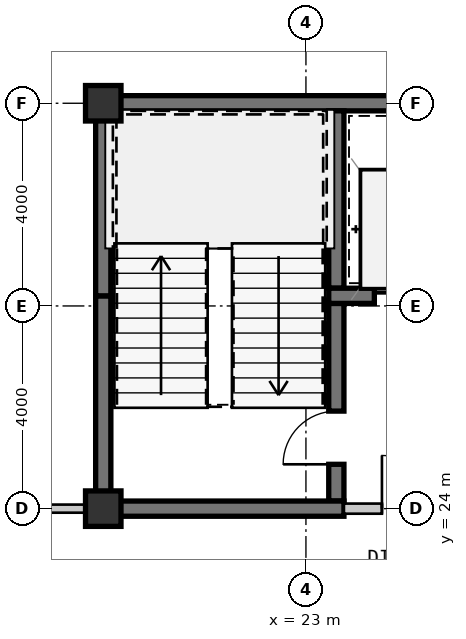
"""IFC4 building model, lengths in metres.
Left out: names, types, materials, properties, quantities, classifications, styles, units other than length and angle.
Written with IfcOpenShell. Run it as: python <this file> out.ifc"""

import sys

from ifc_helpers import new_model, si_unit, direction, frame, frame_2d, origin, origin_2d, place, context, subcontext, project, spatial, rectangle, extrude, source, transform, mapped, element, fill, save


model = new_model("IFC4")
c1 = context("Model", 3, precision=1e-05, world=origin(), true_north=direction((0.0, 1.0)))
c2 = subcontext(c1, "Body", "Model", "MODEL_VIEW")
j1 = project(units=[si_unit("LENGTHUNIT", "METRE"), si_unit("PLANEANGLEUNIT", "RADIAN")], contexts=[c1])
p1 = place(None, origin())
s1 = spatial("IfcSite", under=j1, at=p1, CompositionType="ELEMENT")
p2 = place(p1, origin())
s2 = spatial("IfcBuilding", under=s1, at=p2, CompositionType="ELEMENT")
p3 = place(p2, frame((0.0, 0.0, 80.85)))
s3 = spatial("IfcBuildingStorey", under=s2, at=p3, CompositionType="ELEMENT", Elevation=80.85)
m1 = source(origin(), c2, "Body", "SweptSolid", [
    extrude(rectangle(XDim=0.7, YDim=0.7, at=origin_2d()), origin(), (0.0, 0.0, 1.0), 3.15),
])
for number, where, z_axis, x_axis in (
    (1, (19.0, 24.0, 0.0), (0.0, 0.0, 1.0), (1.0, 0.0, 0.0)),
    (2, (19.0, 32.0, 0.0), (0.0, 0.0, 1.0), (1.0, 0.0, 0.0)),
):
    element("IfcColumn", number, at=place(p3, frame(where, z_axis=z_axis, x_axis=x_axis)), inside=s3, PredefinedType="COLUMN", context=c2, shape_type="MappedRepresentation", body=[
        mapped(m1, transform((0.0, 0.0, 0.0), scale=1.0)),
    ])
m2 = source(origin(), c2, "Body", "SweptSolid", [
    extrude(rectangle(XDim=9.15, YDim=0.3, at=frame_2d((4.575, 0.0))), origin(), (0.0, 0.0, 1.0), 2.93),
])
p4 = place(p3, frame((18.85, 32.0, 0.0), z_axis=(0.0, 0.0, 1.0), x_axis=(1.0, 0.0, 0.0)))
e3 = element("IfcWall", 3, at=p4, inside=s3, PredefinedType="SHEAR", context=c2, shape_type="MappedRepresentation", body=[
    mapped(m2, transform((0.0, 0.0, 0.0), scale=1.0)),
])
m3 = source(origin(), c2, "Body", "SweptSolid", [
    extrude(rectangle(XDim=4.05, YDim=0.3, at=frame_2d((2.025, 0.0))), origin(), (0.0, 0.0, 1.0), 2.93),
])
p5 = place(p3, frame((19.0, 24.15, 0.0), z_axis=(0.0, 0.0, 1.0), x_axis=(0.0, 1.0, 0.0)))
e4 = element("IfcWall", 4, at=p5, inside=s3, PredefinedType="SHEAR", context=c2, shape_type="MappedRepresentation", body=[
    mapped(m3, transform((0.0, 0.0, 0.0), scale=1.0)),
])
m4 = source(origin(), c2, "Body", "SweptSolid", [
    extrude(rectangle(XDim=3.65, YDim=0.3, at=frame_2d((1.825, 0.0))), origin(), (0.0, 0.0, 1.0), 2.93),
])
p6 = place(p3, frame((19.0, 28.2, 0.0), z_axis=(0.0, 0.0, 1.0), x_axis=(0.0, 1.0, 0.0)))
e5 = element("IfcWall", 5, at=p6, inside=s3, PredefinedType="SHEAR", context=c2, shape_type="MappedRepresentation", body=[
    mapped(m4, transform((0.0, 0.0, 0.0), scale=1.0)),
])
m5 = source(origin(), c2, "Body", "SweptSolid", [
    extrude(rectangle(XDim=3.5, YDim=0.3, at=frame_2d((1.75, 0.0))), origin(), (0.0, 0.0, 1.0), 2.93),
])
p7 = place(p3, frame((23.6, 28.35, 0.0), z_axis=(0.0, 0.0, 1.0), x_axis=(0.0, 1.0, 0.0)))
e6 = element("IfcWall", 6, at=p7, inside=s3, PredefinedType="SHEAR", context=c2, shape_type="MappedRepresentation", body=[
    mapped(m5, transform((0.0, 0.0, 0.0), scale=1.0)),
])
m6 = source(origin(), c2, "Body", "SweptSolid", [
    extrude(rectangle(XDim=3.9, YDim=0.3, at=frame_2d((1.95, 0.0))), origin(), (0.0, 0.0, 1.0), 2.93),
])
p8 = place(p3, frame((23.6, 24.15, 0.0), z_axis=(0.0, 0.0, 1.0), x_axis=(0.0, 1.0, 0.0)))
e7 = element("IfcWall", 7, at=p8, inside=s3, PredefinedType="SHEAR", context=c2, shape_type="MappedRepresentation", body=[
    mapped(m6, transform((0.0, 0.0, 0.0), scale=1.0)),
])
m7 = source(origin(), c2, "Body", "SweptSolid", [
    extrude(rectangle(XDim=1.05, YDim=2.1, at=frame_2d((0.525, 1.05))), frame((0.0, 0.16, 0.0), z_axis=(0.0, -1.0, 0.0), x_axis=(1.0, 0.0, 0.0)), (0.0, 0.0, 1.0), 0.32),
])
p9 = place(p8, frame((0.725, 0.0, 0.0)))
e8 = element("IfcOpeningElement", 8, at=p9, cuts=e7, PredefinedType="OPENING", context=c2, shape_type="MappedRepresentation", body=[
    mapped(m7, transform((0.0, 0.0, 0.0), scale=1.0)),
])
m8 = source(origin(), c2, "Body", "SweptSolid", [
    extrude(rectangle(XDim=4.9, YDim=0.3, at=frame_2d((2.45, 0.0))), origin(), (0.0, 0.0, 1.0), 2.93),
])
p10 = place(p3, frame((18.85, 24.0, 0.0), z_axis=(0.0, 0.0, 1.0), x_axis=(1.0, 0.0, 0.0)))
e9 = element("IfcWall", 9, at=p10, inside=s3, PredefinedType="SHEAR", context=c2, shape_type="MappedRepresentation", body=[
    mapped(m8, transform((0.0, 0.0, 0.0), scale=1.0)),
])
m9 = source(origin(), c2, "Body", "SweptSolid", [
    extrude(rectangle(XDim=2.9, YDim=0.3, at=frame_2d((1.45, 0.0))), origin(), (0.0, 0.0, 1.0), 2.93),
])
p11 = place(p3, frame((23.45, 28.2, 0.0), z_axis=(0.0, 0.0, 1.0), x_axis=(1.0, 0.0, 0.0)))
e10 = element("IfcWall", 10, at=p11, inside=s3, PredefinedType="SHEAR", context=c2, shape_type="MappedRepresentation", body=[
    mapped(m9, transform((0.0, 0.0, 0.0), scale=1.0)),
])
m10 = source(origin(), c2, "Body", "SweptSolid", [
    extrude(rectangle(XDim=1.1, YDim=2.15, at=frame_2d((0.55, 1.075))), frame((0.0, 0.16, 0.0), z_axis=(0.0, -1.0, 0.0), x_axis=(1.0, 0.0, 0.0)), (0.0, 0.0, 1.0), 0.32),
])
p12 = place(p11, frame((0.9, 0.0, 0.0)))
e11 = element("IfcOpeningElement", 11, at=p12, cuts=e10, PredefinedType="OPENING", context=c2, shape_type="MappedRepresentation", body=[
    mapped(m10, transform((0.0, 0.0, 0.0), scale=1.0)),
])
m11 = source(origin(), c2, "Body", "SweptSolid", [
    extrude(rectangle(XDim=2.7, YDim=0.2, at=frame_2d((1.35, 0.0))), origin(), (0.0, 0.0, 1.0), 2.47),
])
p13 = place(p3, frame((23.75, 24.0, 0.0), z_axis=(0.0, 0.0, 1.0), x_axis=(1.0, 0.0, 0.0)))
e12 = element("IfcWall", 12, at=p13, inside=s3, PredefinedType="SOLIDWALL", context=c2, shape_type="MappedRepresentation", body=[
    mapped(m11, transform((0.0, 0.0, 0.0), scale=1.0)),
])
m12 = source(origin(), c2, "Body", "SweptSolid", [
    extrude(rectangle(XDim=1.05, YDim=2.1, at=frame_2d((0.525, 1.05))), frame((0.0, 0.11, 0.0), z_axis=(0.0, -1.0, 0.0), x_axis=(1.0, 0.0, 0.0)), (0.0, 0.0, 1.0), 0.22),
])
p14 = place(p13, frame((0.75, 0.0, 0.0)))
e13 = element("IfcOpeningElement", 13, at=p14, cuts=e12, PredefinedType="OPENING", context=c2, shape_type="MappedRepresentation", body=[
    mapped(m12, transform((0.0, 0.0, 0.0), scale=1.0)),
])
m13 = source(origin(), c2, "Body", "SweptSolid", [
    extrude(rectangle(XDim=4.17, YDim=0.16, at=frame_2d((2.085, 0.0))), origin(), (0.0, 0.0, 1.0), 2.93),
])
p15 = place(p3, frame((14.68, 24.0, 0.0), z_axis=(0.0, 0.0, 1.0), x_axis=(1.0, 0.0, 0.0)))
e14 = element("IfcWall", 14, at=p15, inside=s3, PredefinedType="PARTITIONING", context=c2, shape_type="MappedRepresentation", body=[
    mapped(m13, transform((0.0, 0.0, 0.0), scale=1.0)),
])
m14 = source(origin(), c2, "Body", "SweptSolid", [
    extrude(rectangle(XDim=0.92, YDim=2.1, at=frame_2d((0.46, 1.05))), frame((0.0, 0.09, 0.0), z_axis=(0.0, -1.0, 0.0), x_axis=(1.0, 0.0, 0.0)), (0.0, 0.0, 1.0), 0.18),
])
p16 = place(p15, frame((1.69, 0.0, 0.0)))
e15 = element("IfcOpeningElement", 15, at=p16, cuts=e14, PredefinedType="OPENING", context=c2, shape_type="MappedRepresentation", body=[
    mapped(m14, transform((0.0, 0.0, 0.0), scale=1.0)),
])
m15 = source(origin(), c2, "Body", "SweptSolid", [
    extrude(rectangle(XDim=1.05, YDim=2.1, at=frame_2d((0.525, 1.05))), frame((0.0, 0.025, 0.0), z_axis=(0.0, -1.0, 0.0), x_axis=(1.0, 0.0, 0.0)), (0.0, 0.0, 1.0), 0.05),
])
p17 = place(p9, origin())
e16 = element("IfcDoor", 16, at=p17, inside=s3, OperationType="SINGLE_SWING_LEFT", PredefinedType="DOOR", context=c2, shape_type="MappedRepresentation", body=[
    mapped(m15, transform((0.0, 0.0, 0.0), scale=1.0)),
])
fill(e8, e16)
m16 = source(origin(), c2, "Body", "SweptSolid", [
    extrude(rectangle(XDim=1.1, YDim=2.15, at=frame_2d((0.55, 1.075))), frame((0.0, 0.025, 0.0), z_axis=(0.0, -1.0, 0.0), x_axis=(1.0, 0.0, 0.0)), (0.0, 0.0, 1.0), 0.05),
])
p18 = place(p12, origin())
e17 = element("IfcDoor", 17, at=p18, inside=s3, OperationType="SLIDING_TO_LEFT", PredefinedType="DOOR", context=c2, shape_type="MappedRepresentation", body=[
    mapped(m16, transform((0.0, 0.0, 0.0), scale=1.0)),
])
fill(e11, e17)
p19 = place(p14, origin())
e18 = element("IfcDoor", 18, at=p19, inside=s3, OperationType="SINGLE_SWING_LEFT", PredefinedType="DOOR", context=c2, shape_type="MappedRepresentation", body=[
    mapped(m15, transform((0.0, 0.0, 0.0), scale=1.0)),
])
fill(e13, e18)
save(model, sys.argv[1])
